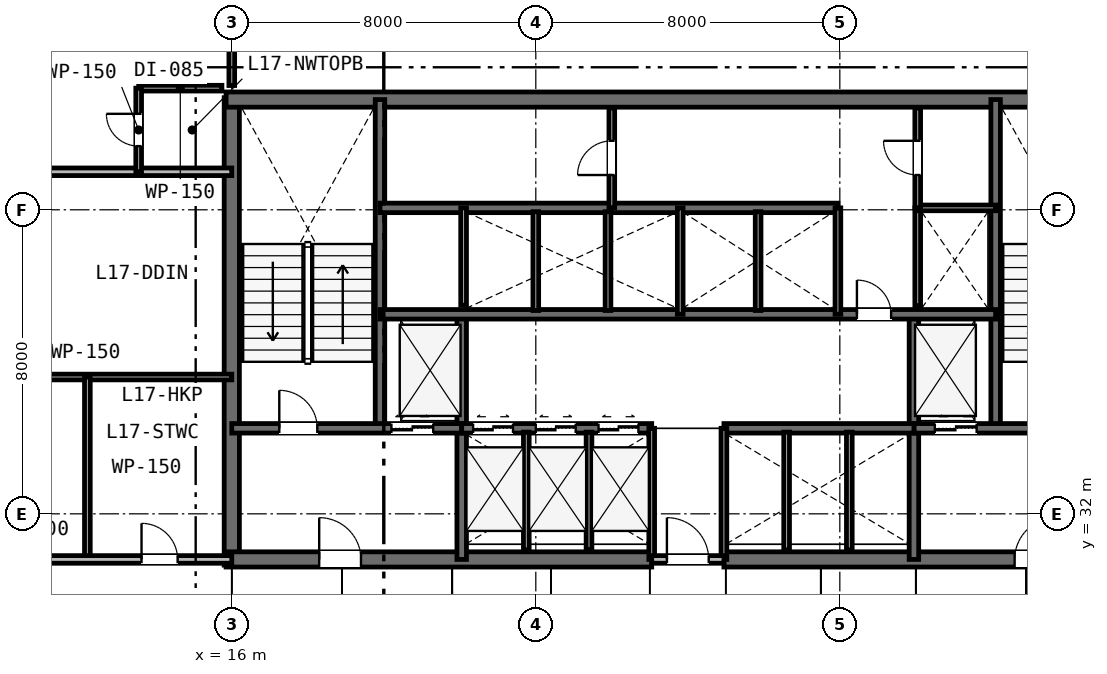
"""IFC4 building model, lengths in metres.
Left out: names, types, materials, properties, quantities, classifications, styles, units other than length and angle.
Written with IfcOpenShell. Run it as: python <this file> out.ifc"""

import sys

from ifc_helpers import new_model, si_unit, direction, frame, frame_2d, origin, place, context, subcontext, project, spatial, rectangle, extrude, element, fill, save


model = new_model("IFC4")
c1 = context("Model", 3, precision=1e-05, world=origin(), true_north=direction((0.0, 1.0)))
c2 = subcontext(c1, "Body", "Model", "MODEL_VIEW")
j1 = project(units=[si_unit("LENGTHUNIT", "METRE"), si_unit("PLANEANGLEUNIT", "RADIAN")], contexts=[c1])
p1 = place(None, origin())
s1 = spatial("IfcSite", under=j1, at=p1, CompositionType="ELEMENT")
p2 = place(p1, origin())
s2 = spatial("IfcBuilding", under=s1, at=p2, CompositionType="ELEMENT")
p3 = place(p2, frame((0.0, 0.0, 69.0)))
s3 = spatial("IfcBuildingStorey", under=s2, at=p3, CompositionType="ELEMENT", Elevation=69.0)
p4 = place(p3, frame((16.0, 30.65, 0.0), z_axis=(0.0, 0.0, 1.0), x_axis=(0.0, 1.0, 0.0)))
e1 = element("IfcWall", 1, at=p4, inside=s3, PredefinedType="SHEAR", context=c2, shape_type="SweptSolid", body=[
    extrude(rectangle(XDim=12.3, YDim=0.4, at=frame_2d((6.15, 0.0))), origin(), (0.0, 0.0, 1.0), 3.6),
])
p5 = place(p3, frame((15.85, 42.9, 0.0), z_axis=(0.0, 0.0, 1.0), x_axis=(1.0, 0.0, 0.0)))
e2 = element("IfcWall", 2, at=p5, inside=s3, PredefinedType="SHEAR", context=c2, shape_type="SweptSolid", body=[
    extrude(rectangle(XDim=24.3, YDim=0.4, at=frame_2d((12.15, 0.0))), origin(), (0.0, 0.0, 1.0), 3.6),
])
p6 = place(p3, frame((15.85, 30.8, 0.0), z_axis=(0.0, 0.0, 1.0), x_axis=(1.0, 0.0, 0.0)))
e3 = element("IfcWall", 3, at=p6, inside=s3, PredefinedType="SHEAR", context=c2, shape_type="SweptSolid", body=[
    extrude(rectangle(XDim=11.2, YDim=0.4, at=frame_2d((5.6, 0.0))), origin(), (0.0, 0.0, 1.0), 3.6),
])
p7 = place(p6, frame((2.45, 0.0, 0.0)))
e4 = element("IfcOpeningElement", 4, at=p7, cuts=e3, PredefinedType="OPENING", context=c2, shape_type="SweptSolid", body=[
    extrude(rectangle(XDim=1.1, YDim=2.15, at=frame_2d((0.55, 1.075))), frame((0.0, 0.21, 0.0), z_axis=(0.0, -1.0, 0.0), x_axis=(1.0, 0.0, 0.0)), (0.0, 0.0, 1.0), 0.42),
])
p8 = place(p3, frame((28.95, 30.8, 0.0), z_axis=(0.0, 0.0, 1.0), x_axis=(1.0, 0.0, 0.0)))
e5 = element("IfcWall", 5, at=p8, inside=s3, PredefinedType="SHEAR", context=c2, shape_type="SweptSolid", body=[
    extrude(rectangle(XDim=11.2, YDim=0.4, at=frame_2d((5.6, 0.0))), origin(), (0.0, 0.0, 1.0), 3.6),
])
p9 = place(p8, frame((7.65, 0.0, 0.0)))
e6 = element("IfcOpeningElement", 6, at=p9, cuts=e5, PredefinedType="OPENING", context=c2, shape_type="SweptSolid", body=[
    extrude(rectangle(XDim=1.1, YDim=2.15, at=frame_2d((0.55, 1.075))), frame((0.0, 0.21, 0.0), z_axis=(0.0, -1.0, 0.0), x_axis=(1.0, 0.0, 0.0)), (0.0, 0.0, 1.0), 0.42),
])
for number, where, z_axis, x_axis in (
    (7, (19.9, 34.25, 0.0), (0.0, 0.0, 1.0), (0.0, 1.0, 0.0)),
    (8, (36.1, 34.25, 0.0), (0.0, 0.0, 1.0), (0.0, 1.0, 0.0)),
):
    element("IfcWall", number, at=place(p3, frame(where, z_axis=z_axis, x_axis=x_axis)), inside=s3, PredefinedType="SHEAR", context=c2, shape_type="SweptSolid", body=[
        extrude(rectangle(XDim=8.65, YDim=0.25, at=frame_2d((4.325, 0.0))), origin(), (0.0, 0.0, 1.0), 3.6),
    ])
for number, where, z_axis, x_axis in (
    (9, (22.05, 30.8, 0.0), (0.0, 0.0, 1.0), (0.0, 1.0, 0.0)),
    (10, (33.95, 30.8, 0.0), (0.0, 0.0, 1.0), (0.0, 1.0, 0.0)),
):
    element("IfcWall", number, at=place(p3, frame(where, z_axis=z_axis, x_axis=x_axis)), inside=s3, PredefinedType="SHEAR", context=c2, shape_type="SweptSolid", body=[
        extrude(rectangle(XDim=6.45, YDim=0.25, at=frame_2d((3.225, 0.0))), origin(), (0.0, 0.0, 1.0), 3.6),
    ])
p10 = place(p3, frame((16.0, 34.25, 0.0), z_axis=(0.0, 0.0, 1.0), x_axis=(1.0, 0.0, 0.0)))
e11 = element("IfcWall", 11, at=p10, inside=s3, PredefinedType="SHEAR", context=c2, shape_type="SweptSolid", body=[
    extrude(rectangle(XDim=6.05, YDim=0.25, at=frame_2d((3.025, 0.0))), origin(), (0.0, 0.0, 1.0), 3.6),
])
p11 = place(p10, frame((1.25, 0.0, 0.0)))
e12 = element("IfcOpeningElement", 12, at=p11, cuts=e11, PredefinedType="OPENING", context=c2, shape_type="SweptSolid", body=[
    extrude(rectangle(XDim=1.0, YDim=2.15, at=frame_2d((0.5, 1.075))), frame((0.0, 0.135, 0.0), z_axis=(0.0, -1.0, 0.0), x_axis=(1.0, 0.0, 0.0)), (0.0, 0.0, 1.0), 0.27),
])
p12 = place(p10, frame((4.2, 0.0, 0.0)))
e13 = element("IfcOpeningElement", 13, at=p12, cuts=e11, PredefinedType="OPENING", context=c2, shape_type="SweptSolid", body=[
    extrude(rectangle(XDim=1.1, YDim=2.15, at=frame_2d((0.55, 1.075))), frame((0.0, 0.135, 0.0), z_axis=(0.0, -1.0, 0.0), x_axis=(1.0, 0.0, 0.0)), (0.0, 0.0, 1.0), 0.27),
])
p13 = place(p3, frame((33.95, 34.25, 0.0), z_axis=(0.0, 0.0, 1.0), x_axis=(1.0, 0.0, 0.0)))
e14 = element("IfcWall", 14, at=p13, inside=s3, PredefinedType="SHEAR", context=c2, shape_type="SweptSolid", body=[
    extrude(rectangle(XDim=6.05, YDim=0.25, at=frame_2d((3.025, 0.0))), origin(), (0.0, 0.0, 1.0), 3.6),
])
p14 = place(p13, frame((3.7, 0.0, 0.0)))
e15 = element("IfcOpeningElement", 15, at=p14, cuts=e14, PredefinedType="OPENING", context=c2, shape_type="SweptSolid", body=[
    extrude(rectangle(XDim=1.0, YDim=2.15, at=frame_2d((0.5, 1.075))), frame((0.0, 0.135, 0.0), z_axis=(0.0, -1.0, 0.0), x_axis=(1.0, 0.0, 0.0)), (0.0, 0.0, 1.0), 0.27),
])
p15 = place(p13, frame((0.55, 0.0, 0.0)))
e16 = element("IfcOpeningElement", 16, at=p15, cuts=e14, PredefinedType="OPENING", context=c2, shape_type="SweptSolid", body=[
    extrude(rectangle(XDim=1.1, YDim=2.15, at=frame_2d((0.55, 1.075))), frame((0.0, 0.135, 0.0), z_axis=(0.0, -1.0, 0.0), x_axis=(1.0, 0.0, 0.0)), (0.0, 0.0, 1.0), 0.27),
])
p16 = place(p3, frame((22.05, 34.25, 0.0), z_axis=(0.0, 0.0, 1.0), x_axis=(1.0, 0.0, 0.0)))
e17 = element("IfcWall", 17, at=p16, inside=s3, PredefinedType="SHEAR", context=c2, shape_type="SweptSolid", body=[
    extrude(rectangle(XDim=5.0, YDim=0.25, at=frame_2d((2.5, 0.0))), origin(), (0.0, 0.0, 1.0), 3.6),
])
p17 = place(p16, frame((0.3, 0.0, 0.0)))
e18 = element("IfcOpeningElement", 18, at=p17, cuts=e17, PredefinedType="OPENING", context=c2, shape_type="SweptSolid", body=[
    extrude(rectangle(XDim=1.05, YDim=2.15, at=frame_2d((0.525, 1.075))), frame((0.0, 0.135, 0.0), z_axis=(0.0, -1.0, 0.0), x_axis=(1.0, 0.0, 0.0)), (0.0, 0.0, 1.0), 0.27),
])
p18 = place(p16, frame((1.95, 0.0, 0.0)))
e19 = element("IfcOpeningElement", 19, at=p18, cuts=e17, PredefinedType="OPENING", context=c2, shape_type="SweptSolid", body=[
    extrude(rectangle(XDim=1.05, YDim=2.15, at=frame_2d((0.525, 1.075))), frame((0.0, 0.135, 0.0), z_axis=(0.0, -1.0, 0.0), x_axis=(1.0, 0.0, 0.0)), (0.0, 0.0, 1.0), 0.27),
])
p19 = place(p16, frame((3.6, 0.0, 0.0)))
e20 = element("IfcOpeningElement", 20, at=p19, cuts=e17, PredefinedType="OPENING", context=c2, shape_type="SweptSolid", body=[
    extrude(rectangle(XDim=1.05, YDim=2.15, at=frame_2d((0.525, 1.075))), frame((0.0, 0.135, 0.0), z_axis=(0.0, -1.0, 0.0), x_axis=(1.0, 0.0, 0.0)), (0.0, 0.0, 1.0), 0.27),
])
p20 = place(p3, frame((28.95, 34.25, 0.0), z_axis=(0.0, 0.0, 1.0), x_axis=(1.0, 0.0, 0.0)))
e21 = element("IfcWall", 21, at=p20, inside=s3, PredefinedType="SHEAR", context=c2, shape_type="SweptSolid", body=[
    extrude(rectangle(XDim=5.0, YDim=0.25, at=frame_2d((2.5, 0.0))), origin(), (0.0, 0.0, 1.0), 3.6),
])
p21 = place(p3, frame((19.9, 37.25, 0.0), z_axis=(0.0, 0.0, 1.0), x_axis=(1.0, 0.0, 0.0)))
e22 = element("IfcWall", 22, at=p21, inside=s3, PredefinedType="SHEAR", context=c2, shape_type="SweptSolid", body=[
    extrude(rectangle(XDim=16.2, YDim=0.25, at=frame_2d((8.1, 0.0))), origin(), (0.0, 0.0, 1.0), 3.6),
])
p22 = place(p21, frame((12.55, 0.0, 0.0)))
e23 = element("IfcOpeningElement", 23, at=p22, cuts=e22, PredefinedType="OPENING", context=c2, shape_type="SweptSolid", body=[
    extrude(rectangle(XDim=0.9, YDim=2.15, at=frame_2d((0.45, 1.075))), frame((0.0, 0.135, 0.0), z_axis=(0.0, -1.0, 0.0), x_axis=(1.0, 0.0, 0.0)), (0.0, 0.0, 1.0), 0.27),
])
p23 = place(p3, frame((19.9, 40.05, 0.0), z_axis=(0.0, 0.0, 1.0), x_axis=(1.0, 0.0, 0.0)))
e24 = element("IfcWall", 24, at=p23, inside=s3, PredefinedType="SHEAR", context=c2, shape_type="SweptSolid", body=[
    extrude(rectangle(XDim=12.05, YDim=0.25, at=frame_2d((6.025, 0.0))), origin(), (0.0, 0.0, 1.0), 3.6),
])
for number, where, z_axis, x_axis in (
    (25, (27.05, 30.8, 0.0), (0.0, 0.0, 1.0), (0.0, 1.0, 0.0)),
    (26, (28.95, 30.8, 0.0), (0.0, 0.0, 1.0), (0.0, 1.0, 0.0)),
):
    element("IfcWall", number, at=place(p3, frame(where, z_axis=z_axis, x_axis=x_axis)), inside=s3, PredefinedType="PLUMBINGWALL", context=c2, shape_type="SweptSolid", body=[
        extrude(rectangle(XDim=3.45, YDim=0.15, at=frame_2d((1.725, 0.0))), origin(), (0.0, 0.0, 1.0), 3.33),
    ])
p24 = place(p3, frame((27.05, 30.8, 0.0), z_axis=(0.0, 0.0, 1.0), x_axis=(1.0, 0.0, 0.0)))
e27 = element("IfcWall", 27, at=p24, inside=s3, PredefinedType="PARTITIONING", context=c2, shape_type="SweptSolid", body=[
    extrude(rectangle(XDim=1.9, YDim=0.2, at=frame_2d((0.95, 0.0))), origin(), (0.0, 0.0, 1.0), 3.33),
])
p25 = place(p24, frame((0.4, 0.0, 0.0)))
e28 = element("IfcOpeningElement", 28, at=p25, cuts=e27, PredefinedType="OPENING", context=c2, shape_type="SweptSolid", body=[
    extrude(rectangle(XDim=1.1, YDim=2.15, at=frame_2d((0.55, 1.075))), frame((0.0, 0.11, 0.0), z_axis=(0.0, -1.0, 0.0), x_axis=(1.0, 0.0, 0.0)), (0.0, 0.0, 1.0), 0.22),
])
for number, where, z_axis, x_axis in (
    (29, (23.75, 31.05, 0.0), (0.0, 0.0, 1.0), (0.0, 1.0, 0.0)),
    (30, (25.4, 31.05, 0.0), (0.0, 0.0, 1.0), (0.0, 1.0, 0.0)),
    (31, (30.6, 31.05, 0.0), (0.0, 0.0, 1.0), (0.0, 1.0, 0.0)),
    (32, (32.25, 31.05, 0.0), (0.0, 0.0, 1.0), (0.0, 1.0, 0.0)),
):
    element("IfcWall", number, at=place(p3, frame(where, z_axis=z_axis, x_axis=x_axis)), inside=s3, PredefinedType="PLUMBINGWALL", context=c2, shape_type="SweptSolid", body=[
        extrude(rectangle(XDim=3.1, YDim=0.15, at=frame_2d((1.55, 0.0))), origin(), (0.0, 0.0, 1.0), 3.33),
    ])
p26 = place(p3, frame((22.1, 37.49, 0.0), z_axis=(0.0, 0.0, 1.0), x_axis=(0.0, 1.0, 0.0)))
e33 = element("IfcWall", 33, at=p26, inside=s3, PredefinedType="PLUMBINGWALL", context=c2, shape_type="SweptSolid", body=[
    extrude(rectangle(XDim=2.56, YDim=0.15, at=frame_2d((1.28, 0.0))), origin(), (0.0, 0.0, 1.0), 3.33),
])
p27 = place(p3, frame((27.8, 37.25, 0.0), z_axis=(0.0, 0.0, 1.0), x_axis=(0.0, 1.0, 0.0)))
e34 = element("IfcWall", 34, at=p27, inside=s3, PredefinedType="PLUMBINGWALL", context=c2, shape_type="SweptSolid", body=[
    extrude(rectangle(XDim=2.8, YDim=0.15, at=frame_2d((1.4, 0.0))), origin(), (0.0, 0.0, 1.0), 3.33),
])
for number, where, z_axis, x_axis in (
    (35, (24.0, 37.35, 0.0), (0.0, 0.0, 1.0), (0.0, 1.0, 0.0)),
    (36, (25.9, 37.35, 0.0), (0.0, 0.0, 1.0), (0.0, 1.0, 0.0)),
):
    element("IfcWall", number, at=place(p3, frame(where, z_axis=z_axis, x_axis=x_axis)), inside=s3, PredefinedType="PLUMBINGWALL", context=c2, shape_type="SweptSolid", body=[
        extrude(rectangle(XDim=2.6, YDim=0.15, at=frame_2d((1.3, 0.0))), origin(), (0.0, 0.0, 1.0), 3.33),
    ])
p28 = place(p3, frame((31.95, 37.25, 0.0), z_axis=(0.0, 0.0, 1.0), x_axis=(0.0, 1.0, 0.0)))
e37 = element("IfcWall", 37, at=p28, inside=s3, PredefinedType="PLUMBINGWALL", context=c2, shape_type="SweptSolid", body=[
    extrude(rectangle(XDim=2.8, YDim=0.15, at=frame_2d((1.4, 0.0))), origin(), (0.0, 0.0, 1.0), 3.33),
])
p29 = place(p3, frame((29.85, 37.35, 0.0), z_axis=(0.0, 0.0, 1.0), x_axis=(0.0, 1.0, 0.0)))
e38 = element("IfcWall", 38, at=p29, inside=s3, PredefinedType="PLUMBINGWALL", context=c2, shape_type="SweptSolid", body=[
    extrude(rectangle(XDim=2.6, YDim=0.15, at=frame_2d((1.3, 0.0))), origin(), (0.0, 0.0, 1.0), 3.33),
])
p30 = place(p3, frame((34.05, 37.473, 0.0), z_axis=(0.0, 0.0, 1.0), x_axis=(0.0, 1.0, 0.0)))
e39 = element("IfcWall", 39, at=p30, inside=s3, PredefinedType="PLUMBINGWALL", context=c2, shape_type="SweptSolid", body=[
    extrude(rectangle(XDim=2.577, YDim=0.15, at=frame_2d((1.288, 0.0))), origin(), (0.0, 0.0, 1.0), 3.33),
])
p31 = place(p3, frame((34.05, 40.05, 0.0), z_axis=(0.0, 0.0, 1.0), x_axis=(1.0, 0.0, 0.0)))
e40 = element("IfcWall", 40, at=p31, inside=s3, PredefinedType="PARTITIONING", context=c2, shape_type="SweptSolid", body=[
    extrude(rectangle(XDim=2.05, YDim=0.15, at=frame_2d((1.025, 0.0))), origin(), (0.0, 0.0, 1.0), 3.33),
])
p32 = place(p3, frame((34.05, 40.05, 0.0), z_axis=(0.0, 0.0, 1.0), x_axis=(0.0, 1.0, 0.0)))
e41 = element("IfcWall", 41, at=p32, inside=s3, PredefinedType="PARTITIONING", context=c2, shape_type="SweptSolid", body=[
    extrude(rectangle(XDim=2.63, YDim=0.15, at=frame_2d((1.315, 0.0))), origin(), (0.0, 0.0, 1.0), 3.33),
])
p33 = place(p32, frame((0.865, 0.0, 0.0)))
e42 = element("IfcOpeningElement", 42, at=p33, cuts=e41, PredefinedType="OPENING", context=c2, shape_type="SweptSolid", body=[
    extrude(rectangle(XDim=0.9, YDim=2.15, at=frame_2d((0.45, 1.075))), frame((0.0, 0.085, 0.0), z_axis=(0.0, -1.0, 0.0), x_axis=(1.0, 0.0, 0.0)), (0.0, 0.0, 1.0), 0.17),
])
p34 = place(p3, frame((26.0, 40.05, 0.0), z_axis=(0.0, 0.0, 1.0), x_axis=(0.0, 1.0, 0.0)))
e43 = element("IfcWall", 43, at=p34, inside=s3, PredefinedType="PARTITIONING", context=c2, shape_type="SweptSolid", body=[
    extrude(rectangle(XDim=2.63, YDim=0.15, at=frame_2d((1.315, 0.0))), origin(), (0.0, 0.0, 1.0), 3.33),
])
p35 = place(p34, frame((0.865, 0.0, 0.0)))
e44 = element("IfcOpeningElement", 44, at=p35, cuts=e43, PredefinedType="OPENING", context=c2, shape_type="SweptSolid", body=[
    extrude(rectangle(XDim=0.9, YDim=2.15, at=frame_2d((0.45, 1.075))), frame((0.0, 0.085, 0.0), z_axis=(0.0, -1.0, 0.0), x_axis=(1.0, 0.0, 0.0)), (0.0, 0.0, 1.0), 0.17),
])
p36 = place(p3, frame((8.3, 35.6, 0.0), z_axis=(0.0, 0.0, 1.0), x_axis=(1.0, 0.0, 0.0)))
e45 = element("IfcWall", 45, at=p36, inside=s3, PredefinedType="PARTITIONING", context=c2, shape_type="SweptSolid", body=[
    extrude(rectangle(XDim=7.7, YDim=0.15, at=frame_2d((3.85, 0.0))), origin(), (0.0, 0.0, 1.0), 2.83),
])
p37 = place(p3, frame((12.2, 30.8, 0.0), z_axis=(0.0, 0.0, 1.0), x_axis=(0.0, 1.0, 0.0)))
e46 = element("IfcWall", 46, at=p37, inside=s3, PredefinedType="PARTITIONING", context=c2, shape_type="SweptSolid", body=[
    extrude(rectangle(XDim=4.8, YDim=0.15, at=frame_2d((2.4, 0.0))), origin(), (0.0, 0.0, 1.0), 2.83),
])
p38 = place(p3, frame((8.3, 30.8, 0.0), z_axis=(0.0, 0.0, 1.0), x_axis=(1.0, 0.0, 0.0)))
e47 = element("IfcWall", 47, at=p38, inside=s3, PredefinedType="PARTITIONING", context=c2, shape_type="SweptSolid", body=[
    extrude(rectangle(XDim=7.7, YDim=0.2, at=frame_2d((3.85, 0.0))), origin(), (0.0, 0.0, 1.0), 2.83),
])
p39 = place(p38, frame((5.325, 0.0, 0.0)))
e48 = element("IfcOpeningElement", 48, at=p39, cuts=e47, PredefinedType="OPENING", context=c2, shape_type="SweptSolid", body=[
    extrude(rectangle(XDim=0.95, YDim=2.15, at=frame_2d((0.475, 1.075))), frame((0.0, 0.11, 0.0), z_axis=(0.0, -1.0, 0.0), x_axis=(1.0, 0.0, 0.0)), (0.0, 0.0, 1.0), 0.22),
])
p40 = place(p3, frame((0.1, 41.0, 0.0), z_axis=(0.0, 0.0, 1.0), x_axis=(1.0, 0.0, 0.0)))
e49 = element("IfcWall", 49, at=p40, inside=s3, PredefinedType="PARTITIONING", context=c2, shape_type="SweptSolid", body=[
    extrude(rectangle(XDim=15.9, YDim=0.2, at=frame_2d((7.95, 0.0))), origin(), (0.0, 0.0, 1.0), 2.83),
])
p41 = place(p40, frame((6.779, 0.0, 0.0)))
e50 = element("IfcOpeningElement", 50, at=p41, cuts=e49, PredefinedType="OPENING", context=c2, shape_type="SweptSolid", body=[
    extrude(rectangle(XDim=0.95, YDim=2.15, at=frame_2d((0.475, 1.075))), frame((0.0, 0.11, 0.0), z_axis=(0.0, -1.0, 0.0), x_axis=(1.0, 0.0, 0.0)), (0.0, 0.0, 1.0), 0.22),
])
p42 = place(p3, frame((13.55, 43.2, 0.0), z_axis=(0.0, 0.0, 1.0), x_axis=(1.0, 0.0, 0.0)))
e51 = element("IfcWall", 51, at=p42, inside=s3, PredefinedType="PARTITIONING", context=c2, shape_type="SweptSolid", body=[
    extrude(rectangle(XDim=2.19, YDim=0.15, at=frame_2d((1.095, 0.0))), origin(), (0.0, 0.0, 1.0), 3.33),
])
p43 = place(p3, frame((13.55, 41.0, 0.0), z_axis=(0.0, 0.0, 1.0), x_axis=(0.0, 1.0, 0.0)))
e52 = element("IfcWall", 52, at=p43, inside=s3, PredefinedType="PARTITIONING", context=c2, shape_type="SweptSolid", body=[
    extrude(rectangle(XDim=2.2, YDim=0.15, at=frame_2d((1.1, 0.0))), origin(), (0.0, 0.0, 1.0), 3.33),
])
p44 = place(p43, frame((0.675, 0.0, 0.0)))
e53 = element("IfcOpeningElement", 53, at=p44, cuts=e52, PredefinedType="OPENING", context=c2, shape_type="SweptSolid", body=[
    extrude(rectangle(XDim=0.85, YDim=2.15, at=frame_2d((0.425, 1.075))), frame((0.0, 0.085, 0.0), z_axis=(0.0, -1.0, 0.0), x_axis=(1.0, 0.0, 0.0)), (0.0, 0.0, 1.0), 0.17),
])
p45 = place(p3, frame((16.0, 43.27, 0.0), z_axis=(0.0, 0.0, 1.0), x_axis=(0.0, 1.0, 0.0)))
e54 = element("IfcWall", 54, at=p45, inside=s3, PredefinedType="PARTITIONING", context=c2, shape_type="SweptSolid", body=[
    extrude(rectangle(XDim=4.63, YDim=0.15, at=frame_2d((2.315, 0.0))), origin(), (0.0, 0.0, 1.0), 2.92),
])
p46 = place(p25, origin())
e55 = element("IfcDoor", 55, at=p46, inside=s3, OperationType="SINGLE_SWING_LEFT", PredefinedType="DOOR", context=c2, shape_type="SweptSolid", body=[
    extrude(rectangle(XDim=1.1, YDim=2.15, at=frame_2d((0.55, 1.075))), frame((0.0, 0.025, 0.0), z_axis=(0.0, -1.0, 0.0), x_axis=(1.0, 0.0, 0.0)), (0.0, 0.0, 1.0), 0.05),
])
fill(e28, e55)
p47 = place(p11, origin())
e56 = element("IfcDoor", 56, at=p47, inside=s3, OperationType="SINGLE_SWING_LEFT", PredefinedType="DOOR", context=c2, shape_type="SweptSolid", body=[
    extrude(rectangle(XDim=1.0, YDim=2.15, at=frame_2d((0.5, 1.075))), frame((0.0, 0.025, 0.0), z_axis=(0.0, -1.0, 0.0), x_axis=(1.0, 0.0, 0.0)), (0.0, 0.0, 1.0), 0.05),
])
fill(e12, e56)
p48 = place(p7, origin())
e57 = element("IfcDoor", 57, at=p48, inside=s3, OperationType="SINGLE_SWING_LEFT", PredefinedType="DOOR", context=c2, shape_type="SweptSolid", body=[
    extrude(rectangle(XDim=1.1, YDim=2.15, at=frame_2d((0.55, 1.075))), frame((0.0, 0.025, 0.0), z_axis=(0.0, -1.0, 0.0), x_axis=(1.0, 0.0, 0.0)), (0.0, 0.0, 1.0), 0.05),
])
fill(e4, e57)
p49 = place(p9, origin())
e58 = element("IfcDoor", 58, at=p49, inside=s3, OperationType="SINGLE_SWING_RIGHT", PredefinedType="DOOR", context=c2, shape_type="SweptSolid", body=[
    extrude(rectangle(XDim=1.1, YDim=2.15, at=frame_2d((0.55, 1.075))), frame((0.0, 0.025, 0.0), z_axis=(0.0, -1.0, 0.0), x_axis=(1.0, 0.0, 0.0)), (0.0, 0.0, 1.0), 0.05),
])
fill(e6, e58)
p50 = place(p22, origin())
e59 = element("IfcDoor", 59, at=p50, inside=s3, OperationType="SINGLE_SWING_LEFT", PredefinedType="DOOR", context=c2, shape_type="SweptSolid", body=[
    extrude(rectangle(XDim=0.9, YDim=2.15, at=frame_2d((0.45, 1.075))), frame((0.0, 0.025, 0.0), z_axis=(0.0, -1.0, 0.0), x_axis=(1.0, 0.0, 0.0)), (0.0, 0.0, 1.0), 0.05),
])
fill(e23, e59)
p51 = place(p33, origin())
e60 = element("IfcDoor", 60, at=p51, inside=s3, OperationType="SINGLE_SWING_RIGHT", PredefinedType="DOOR", context=c2, shape_type="SweptSolid", body=[
    extrude(rectangle(XDim=0.9, YDim=2.15, at=frame_2d((0.45, 1.075))), frame((0.0, 0.025, 0.0), z_axis=(0.0, -1.0, 0.0), x_axis=(1.0, 0.0, 0.0)), (0.0, 0.0, 1.0), 0.05),
])
fill(e42, e60)
p52 = place(p35, origin())
e61 = element("IfcDoor", 61, at=p52, inside=s3, OperationType="SINGLE_SWING_LEFT", PredefinedType="DOOR", context=c2, shape_type="SweptSolid", body=[
    extrude(rectangle(XDim=0.9, YDim=2.15, at=frame_2d((0.45, 1.075))), frame((0.0, 0.025, 0.0), z_axis=(0.0, -1.0, 0.0), x_axis=(1.0, 0.0, 0.0)), (0.0, 0.0, 1.0), 0.05),
])
fill(e44, e61)
p53 = place(p39, origin())
e62 = element("IfcDoor", 62, at=p53, inside=s3, OperationType="SINGLE_SWING_LEFT", PredefinedType="DOOR", context=c2, shape_type="SweptSolid", body=[
    extrude(rectangle(XDim=0.95, YDim=2.15, at=frame_2d((0.475, 1.075))), frame((0.0, 0.025, 0.0), z_axis=(0.0, -1.0, 0.0), x_axis=(1.0, 0.0, 0.0)), (0.0, 0.0, 1.0), 0.05),
])
fill(e48, e62)
p54 = place(p44, origin())
e63 = element("IfcDoor", 63, at=p54, inside=s3, OperationType="SINGLE_SWING_RIGHT", PredefinedType="DOOR", context=c2, shape_type="SweptSolid", body=[
    extrude(rectangle(XDim=0.85, YDim=2.15, at=frame_2d((0.425, 1.075))), frame((0.0, 0.025, 0.0), z_axis=(0.0, -1.0, 0.0), x_axis=(1.0, 0.0, 0.0)), (0.0, 0.0, 1.0), 0.05),
])
fill(e53, e63)
p55 = place(p12, origin())
e64 = element("IfcDoor", 64, at=p55, inside=s3, OperationType="DOUBLE_DOOR_SLIDING", PredefinedType="DOOR", context=c2, shape_type="SweptSolid", body=[
    extrude(rectangle(XDim=1.1, YDim=2.15, at=frame_2d((0.55, 1.075))), frame((0.0, 0.025, 0.0), z_axis=(0.0, -1.0, 0.0), x_axis=(1.0, 0.0, 0.0)), (0.0, 0.0, 1.0), 0.05),
])
fill(e13, e64)
p56 = place(p15, origin())
e65 = element("IfcDoor", 65, at=p56, inside=s3, OperationType="DOUBLE_DOOR_SLIDING", PredefinedType="DOOR", context=c2, shape_type="SweptSolid", body=[
    extrude(rectangle(XDim=1.1, YDim=2.15, at=frame_2d((0.55, 1.075))), frame((0.0, 0.025, 0.0), z_axis=(0.0, -1.0, 0.0), x_axis=(1.0, 0.0, 0.0)), (0.0, 0.0, 1.0), 0.05),
])
fill(e16, e65)
p57 = place(p17, origin())
e66 = element("IfcDoor", 66, at=p57, inside=s3, OperationType="DOUBLE_DOOR_SLIDING", PredefinedType="DOOR", context=c2, shape_type="SweptSolid", body=[
    extrude(rectangle(XDim=1.05, YDim=2.15, at=frame_2d((0.525, 1.075))), frame((0.0, 0.025, 0.0), z_axis=(0.0, -1.0, 0.0), x_axis=(1.0, 0.0, 0.0)), (0.0, 0.0, 1.0), 0.05),
])
fill(e18, e66)
p58 = place(p18, origin())
e67 = element("IfcDoor", 67, at=p58, inside=s3, OperationType="DOUBLE_DOOR_SLIDING", PredefinedType="DOOR", context=c2, shape_type="SweptSolid", body=[
    extrude(rectangle(XDim=1.05, YDim=2.15, at=frame_2d((0.525, 1.075))), frame((0.0, 0.025, 0.0), z_axis=(0.0, -1.0, 0.0), x_axis=(1.0, 0.0, 0.0)), (0.0, 0.0, 1.0), 0.05),
])
fill(e19, e67)
p59 = place(p19, origin())
e68 = element("IfcDoor", 68, at=p59, inside=s3, OperationType="DOUBLE_DOOR_SLIDING", PredefinedType="DOOR", context=c2, shape_type="SweptSolid", body=[
    extrude(rectangle(XDim=1.05, YDim=2.15, at=frame_2d((0.525, 1.075))), frame((0.0, 0.025, 0.0), z_axis=(0.0, -1.0, 0.0), x_axis=(1.0, 0.0, 0.0)), (0.0, 0.0, 1.0), 0.05),
])
fill(e20, e68)
save(model, sys.argv[1])
